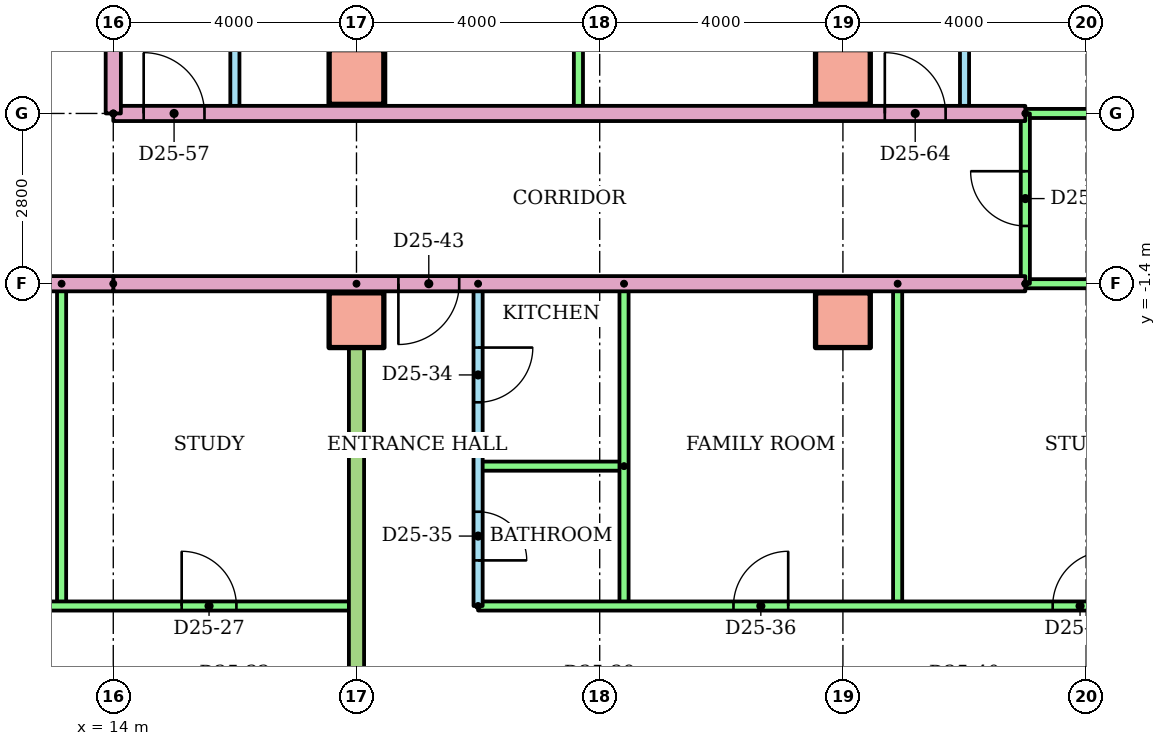
"""IFC4 building model, lengths in metres.
Left out: names, types, materials, properties, quantities, classifications, styles, units other than length and angle.
Written with IfcOpenShell. Run it as: python <this file> out.ifc"""

import sys

from ifc_helpers import new_model, si_unit, direction, frame, frame_2d, origin, origin_2d, place, context, subcontext, project, spatial, rectangle, extrude, element, fill, save


model = new_model("IFC4")
c1 = context("Model", 3, precision=1e-05, world=origin(), true_north=direction((0.0, 1.0)))
c2 = subcontext(c1, "Body", "Model", "MODEL_VIEW")
j1 = project(units=[si_unit("LENGTHUNIT", "METRE"), si_unit("PLANEANGLEUNIT", "RADIAN")], contexts=[c1])
p1 = place(None, origin())
s1 = spatial("IfcSite", under=j1, at=p1, CompositionType="ELEMENT")
p2 = place(p1, origin())
s2 = spatial("IfcBuilding", under=s1, at=p2, CompositionType="ELEMENT")
p3 = place(p2, frame((0.0, 0.0, 96.7)))
s3 = spatial("IfcBuildingStorey", under=s2, at=p3, CompositionType="ELEMENT", Elevation=96.7)
for number, where in (
    (1, (18.0, -2.0, 0.0)),
    (2, (26.0, -2.0, 0.0)),
    (3, (18.0, 2.0, 0.0)),
    (4, (26.0, 2.0, 0.0)),
):
    element("IfcColumn", number, at=place(p3, frame(where)), inside=s3, PredefinedType="COLUMN", context=c2, shape_type="SweptSolid", body=[
        extrude(rectangle(XDim=0.9, YDim=0.9, at=origin_2d()), origin(), (0.0, 0.0, 1.0), 3.2),
    ])
p4 = place(p3, frame((13.15, -1.4, 0.0), z_axis=(0.0, 0.0, 1.0), x_axis=(0.0, -1.0, 0.0)))
e5 = element("IfcWall", 5, at=p4, inside=s3, PredefinedType="PARTITIONING", context=c2, shape_type="SweptSolid", body=[
    extrude(rectangle(XDim=5.3, YDim=0.15, at=frame_2d((2.65, 0.0))), origin(), (0.0, 0.0, 1.0), 2.4),
])
p5 = place(p3, frame((-4.0, -6.7, 0.0)))
e6 = element("IfcWall", 6, at=p5, inside=s3, PredefinedType="PARTITIONING", context=c2, shape_type="SweptSolid", body=[
    extrude(rectangle(XDim=22.0, YDim=0.15, at=frame_2d((11.0, 0.0))), origin(), (0.0, 0.0, 1.0), 2.4),
])
p6 = place(p5, frame((6.075, 0.0, 0.0)))
e7 = element("IfcOpeningElement", 7, at=p6, cuts=e6, PredefinedType="OPENING", context=c2, shape_type="SweptSolid", body=[
    extrude(rectangle(XDim=0.9, YDim=2.1, at=frame_2d((0.45, 1.05))), frame((0.0, 0.085, 0.0), z_axis=(0.0, -1.0, 0.0), x_axis=(1.0, 0.0, 0.0)), (0.0, 0.0, 1.0), 0.17),
])
p7 = place(p5, frame((13.45, 0.0, 0.0)))
e8 = element("IfcOpeningElement", 8, at=p7, cuts=e6, PredefinedType="OPENING", context=c2, shape_type="SweptSolid", body=[
    extrude(rectangle(XDim=0.9, YDim=2.1, at=frame_2d((0.45, 1.05))), frame((0.0, 0.085, 0.0), z_axis=(0.0, -1.0, 0.0), x_axis=(1.0, 0.0, 0.0)), (0.0, 0.0, 1.0), 0.17),
])
p8 = place(p5, frame((19.125, 0.0, 0.0)))
e9 = element("IfcOpeningElement", 9, at=p8, cuts=e6, PredefinedType="OPENING", context=c2, shape_type="SweptSolid", body=[
    extrude(rectangle(XDim=0.9, YDim=2.1, at=frame_2d((0.45, 1.05))), frame((0.0, 0.085, 0.0), z_axis=(0.0, -1.0, 0.0), x_axis=(1.0, 0.0, 0.0)), (0.0, 0.0, 1.0), 0.17),
])
p9 = place(p3, frame((20.0, -1.4, 0.0), z_axis=(0.0, 0.0, 1.0), x_axis=(0.0, -1.0, 0.0)))
e10 = element("IfcWall", 10, at=p9, inside=s3, PredefinedType="PARTITIONING", context=c2, shape_type="SweptSolid", body=[
    extrude(rectangle(XDim=5.3, YDim=0.15, at=frame_2d((2.65, 0.0))), origin(), (0.0, 0.0, 1.0), 2.4),
])
p10 = place(p9, frame((1.05, 0.0, 0.0)))
e11 = element("IfcOpeningElement", 11, at=p10, cuts=e10, PredefinedType="OPENING", context=c2, shape_type="SweptSolid", body=[
    extrude(rectangle(XDim=0.9, YDim=2.1, at=frame_2d((0.45, 1.05))), frame((0.0, 0.085, 0.0), z_axis=(0.0, -1.0, 0.0), x_axis=(1.0, 0.0, 0.0)), (0.0, 0.0, 1.0), 0.17),
])
p11 = place(p9, frame((3.75, 0.0, 0.0)))
e12 = element("IfcOpeningElement", 12, at=p11, cuts=e10, PredefinedType="OPENING", context=c2, shape_type="SweptSolid", body=[
    extrude(rectangle(XDim=0.8, YDim=2.1, at=frame_2d((0.4, 1.05))), frame((0.0, 0.085, 0.0), z_axis=(0.0, -1.0, 0.0), x_axis=(1.0, 0.0, 0.0)), (0.0, 0.0, 1.0), 0.17),
])
p12 = place(p3, frame((22.4, -4.4, 0.0), z_axis=(0.0, 0.0, 1.0), x_axis=(-1.0, 0.0, 0.0)))
e13 = element("IfcWall", 13, at=p12, inside=s3, PredefinedType="PARTITIONING", context=c2, shape_type="SweptSolid", body=[
    extrude(rectangle(XDim=2.4, YDim=0.15, at=frame_2d((1.2, 0.0))), origin(), (0.0, 0.0, 1.0), 2.4),
])
for number, where, z_axis, x_axis in (
    (14, (22.4, -1.4, 0.0), (0.0, 0.0, 1.0), (0.0, -1.0, 0.0)),
    (15, (26.9, -1.4, 0.0), (0.0, 0.0, 1.0), (0.0, -1.0, 0.0)),
):
    element("IfcWall", number, at=place(p3, frame(where, z_axis=z_axis, x_axis=x_axis)), inside=s3, PredefinedType="PARTITIONING", context=c2, shape_type="SweptSolid", body=[
        extrude(rectangle(XDim=5.3, YDim=0.15, at=frame_2d((2.65, 0.0))), origin(), (0.0, 0.0, 1.0), 2.4),
    ])
p13 = place(p3, frame((20.0, -6.7, 0.0)))
e16 = element("IfcWall", 16, at=p13, inside=s3, PredefinedType="PARTITIONING", context=c2, shape_type="SweptSolid", body=[
    extrude(rectangle(XDim=20.62, YDim=0.15, at=frame_2d((10.31, 0.0))), origin(), (0.0, 0.0, 1.0), 2.4),
])
p14 = place(p13, frame((4.2, 0.0, 0.0)))
e17 = element("IfcOpeningElement", 17, at=p14, cuts=e16, PredefinedType="OPENING", context=c2, shape_type="SweptSolid", body=[
    extrude(rectangle(XDim=0.9, YDim=2.1, at=frame_2d((0.45, 1.05))), frame((0.0, 0.085, 0.0), z_axis=(0.0, -1.0, 0.0), x_axis=(1.0, 0.0, 0.0)), (0.0, 0.0, 1.0), 0.17),
])
p15 = place(p13, frame((9.45, 0.0, 0.0)))
e18 = element("IfcOpeningElement", 18, at=p15, cuts=e16, PredefinedType="OPENING", context=c2, shape_type="SweptSolid", body=[
    extrude(rectangle(XDim=0.9, YDim=2.1, at=frame_2d((0.45, 1.05))), frame((0.0, 0.085, 0.0), z_axis=(0.0, -1.0, 0.0), x_axis=(1.0, 0.0, 0.0)), (0.0, 0.0, 1.0), 0.17),
])
p16 = place(p13, frame((16.2, 0.0, 0.0)))
e19 = element("IfcOpeningElement", 19, at=p16, cuts=e16, PredefinedType="OPENING", context=c2, shape_type="SweptSolid", body=[
    extrude(rectangle(XDim=0.9, YDim=2.1, at=frame_2d((0.45, 1.05))), frame((0.0, 0.085, 0.0), z_axis=(0.0, -1.0, 0.0), x_axis=(1.0, 0.0, 0.0)), (0.0, 0.0, 1.0), 0.17),
])
p17 = place(p3, frame((18.0, -1.4, 0.0), z_axis=(0.0, 0.0, 1.0), x_axis=(0.0, -1.0, 0.0)))
e20 = element("IfcWall", 20, at=p17, inside=s3, PredefinedType="PARTITIONING", context=c2, shape_type="SweptSolid", body=[
    extrude(rectangle(XDim=14.81, YDim=0.25, at=frame_2d((7.405, 0.0))), origin(), (0.0, 0.0, 1.0), 2.4),
])
p18 = place(p3, frame((29.0, -1.4, 0.0), z_axis=(0.0, 0.0, 1.0), x_axis=(-1.0, 0.0, 0.0)))
e21 = element("IfcWall", 21, at=p18, inside=s3, PredefinedType="PARTITIONING", context=c2, shape_type="SweptSolid", body=[
    extrude(rectangle(XDim=15.0, YDim=0.25, at=frame_2d((7.5, 0.0))), origin(), (0.0, 0.0, 1.0), 2.4),
])
p19 = place(p18, frame((9.311, 0.0, 0.0)))
e22 = element("IfcOpeningElement", 22, at=p19, cuts=e21, PredefinedType="OPENING", context=c2, shape_type="SweptSolid", body=[
    extrude(rectangle(XDim=1.0, YDim=2.1, at=frame_2d((0.5, 1.05))), frame((0.0, 0.135, 0.0), z_axis=(0.0, -1.0, 0.0), x_axis=(1.0, 0.0, 0.0)), (0.0, 0.0, 1.0), 0.27),
])
p20 = place(p3, frame((40.62, -1.4, 0.0), z_axis=(0.0, 0.0, 1.0), x_axis=(-1.0, 0.0, 0.0)))
e23 = element("IfcWall", 23, at=p20, inside=s3, PredefinedType="PARTITIONING", context=c2, shape_type="SweptSolid", body=[
    extrude(rectangle(XDim=11.62, YDim=0.15, at=frame_2d((5.81, 0.0))), origin(), (0.0, 0.0, 1.0), 2.4),
])
p21 = place(p3, frame((16.0, 9.1, 0.0), z_axis=(0.0, 0.0, 1.0), x_axis=(0.0, -1.0, 0.0)))
e24 = element("IfcWall", 24, at=p21, inside=s3, PredefinedType="PARTITIONING", context=c2, shape_type="SweptSolid", body=[
    extrude(rectangle(XDim=7.7, YDim=0.15, at=frame_2d((3.85, 0.0))), origin(), (0.0, 0.0, 1.0), 2.4),
])
p22 = place(p21, frame((5.125, 0.0, 0.0)))
e25 = element("IfcOpeningElement", 25, at=p22, cuts=e24, PredefinedType="OPENING", context=c2, shape_type="SweptSolid", body=[
    extrude(rectangle(XDim=0.9, YDim=2.1, at=frame_2d((0.45, 1.05))), frame((0.0, 0.085, 0.0), z_axis=(0.0, -1.0, 0.0), x_axis=(1.0, 0.0, 0.0)), (0.0, 0.0, 1.0), 0.17),
])
p23 = place(p21, frame((1.325, 0.0, 0.0)))
e26 = element("IfcOpeningElement", 26, at=p23, cuts=e24, PredefinedType="OPENING", context=c2, shape_type="SweptSolid", body=[
    extrude(rectangle(XDim=0.8, YDim=2.1, at=frame_2d((0.4, 1.05))), frame((0.0, 0.085, 0.0), z_axis=(0.0, -1.0, 0.0), x_axis=(1.0, 0.0, 0.0)), (0.0, 0.0, 1.0), 0.17),
])
for number, where, z_axis, x_axis in (
    (27, (18.4, 9.1, 0.0), (0.0, 0.0, 1.0), (0.0, -1.0, 0.0)),
    (28, (21.65, 9.1, 0.0), (0.0, 0.0, 1.0), (0.0, -1.0, 0.0)),
):
    element("IfcWall", number, at=place(p3, frame(where, z_axis=z_axis, x_axis=x_axis)), inside=s3, PredefinedType="PARTITIONING", context=c2, shape_type="SweptSolid", body=[
        extrude(rectangle(XDim=7.7, YDim=0.15, at=frame_2d((3.85, 0.0))), origin(), (0.0, 0.0, 1.0), 2.4),
    ])
p24 = place(p3, frame((28.0, 9.1, 0.0), z_axis=(0.0, 0.0, 1.0), x_axis=(0.0, -1.0, 0.0)))
e29 = element("IfcWall", 29, at=p24, inside=s3, PredefinedType="PARTITIONING", context=c2, shape_type="SweptSolid", body=[
    extrude(rectangle(XDim=7.7, YDim=0.15, at=frame_2d((3.85, 0.0))), origin(), (0.0, 0.0, 1.0), 2.4),
])
p25 = place(p24, frame((5.125, 0.0, 0.0)))
e30 = element("IfcOpeningElement", 30, at=p25, cuts=e29, PredefinedType="OPENING", context=c2, shape_type="SweptSolid", body=[
    extrude(rectangle(XDim=0.9, YDim=2.1, at=frame_2d((0.45, 1.05))), frame((0.0, 0.085, 0.0), z_axis=(0.0, -1.0, 0.0), x_axis=(1.0, 0.0, 0.0)), (0.0, 0.0, 1.0), 0.17),
])
p26 = place(p24, frame((1.325, 0.0, 0.0)))
e31 = element("IfcOpeningElement", 31, at=p26, cuts=e29, PredefinedType="OPENING", context=c2, shape_type="SweptSolid", body=[
    extrude(rectangle(XDim=0.8, YDim=2.1, at=frame_2d((0.4, 1.05))), frame((0.0, 0.085, 0.0), z_axis=(0.0, -1.0, 0.0), x_axis=(1.0, 0.0, 0.0)), (0.0, 0.0, 1.0), 0.17),
])
p27 = place(p3, frame((26.0, 18.621, 0.0), z_axis=(0.0, 0.0, 1.0), x_axis=(0.0, -1.0, 0.0)))
e32 = element("IfcWall", 32, at=p27, inside=s3, PredefinedType="PARTITIONING", context=c2, shape_type="SweptSolid", body=[
    extrude(rectangle(XDim=17.221, YDim=0.25, at=frame_2d((8.611, 0.0))), origin(), (0.0, 0.0, 1.0), 2.4),
])
p28 = place(p3, frame((14.0, 1.4, 0.0)))
e33 = element("IfcWall", 33, at=p28, inside=s3, PredefinedType="PARTITIONING", context=c2, shape_type="SweptSolid", body=[
    extrude(rectangle(XDim=15.0, YDim=0.25, at=frame_2d((7.5, 0.0))), origin(), (0.0, 0.0, 1.0), 2.4),
])
p29 = place(p28, frame((0.5, 0.0, 0.0)))
e34 = element("IfcOpeningElement", 34, at=p29, cuts=e33, PredefinedType="OPENING", context=c2, shape_type="SweptSolid", body=[
    extrude(rectangle(XDim=1.0, YDim=2.1, at=frame_2d((0.5, 1.05))), frame((0.0, 0.135, 0.0), z_axis=(0.0, -1.0, 0.0), x_axis=(1.0, 0.0, 0.0)), (0.0, 0.0, 1.0), 0.27),
])
p30 = place(p28, frame((12.689, 0.0, 0.0)))
e35 = element("IfcOpeningElement", 35, at=p30, cuts=e33, PredefinedType="OPENING", context=c2, shape_type="SweptSolid", body=[
    extrude(rectangle(XDim=1.0, YDim=2.1, at=frame_2d((0.5, 1.05))), frame((0.0, 0.135, 0.0), z_axis=(0.0, -1.0, 0.0), x_axis=(1.0, 0.0, 0.0)), (0.0, 0.0, 1.0), 0.27),
])
p31 = place(p3, frame((29.0, 1.4, 0.0)))
e36 = element("IfcWall", 36, at=p31, inside=s3, PredefinedType="PARTITIONING", context=c2, shape_type="SweptSolid", body=[
    extrude(rectangle(XDim=11.62, YDim=0.15, at=frame_2d((5.81, 0.0))), origin(), (0.0, 0.0, 1.0), 2.4),
])
p32 = place(p3, frame((29.0, -1.4, 0.0), z_axis=(0.0, 0.0, 1.0), x_axis=(0.0, 1.0, 0.0)))
e37 = element("IfcWall", 37, at=p32, inside=s3, PredefinedType="PARTITIONING", context=c2, shape_type="SweptSolid", body=[
    extrude(rectangle(XDim=2.8, YDim=0.15, at=frame_2d((1.4, 0.0))), origin(), (0.0, 0.0, 1.0), 2.4),
])
p33 = place(p32, frame((0.95, 0.0, 0.0)))
e38 = element("IfcOpeningElement", 38, at=p33, cuts=e37, PredefinedType="OPENING", context=c2, shape_type="SweptSolid", body=[
    extrude(rectangle(XDim=0.9, YDim=2.1, at=frame_2d((0.45, 1.05))), frame((0.0, 0.085, 0.0), z_axis=(0.0, -1.0, 0.0), x_axis=(1.0, 0.0, 0.0)), (0.0, 0.0, 1.0), 0.17),
])
p34 = place(p3, frame((14.0, -1.4, 0.0), z_axis=(0.0, 0.0, 1.0), x_axis=(-1.0, 0.0, 0.0)))
e39 = element("IfcWall", 39, at=p34, inside=s3, PredefinedType="PARTITIONING", context=c2, shape_type="SweptSolid", body=[
    extrude(rectangle(XDim=28.0, YDim=0.25, at=frame_2d((14.0, 0.0))), origin(), (0.0, 0.0, 1.0), 2.4),
])
p35 = place(p34, frame((20.689, 0.0, 0.0)))
e40 = element("IfcOpeningElement", 40, at=p35, cuts=e39, PredefinedType="OPENING", context=c2, shape_type="SweptSolid", body=[
    extrude(rectangle(XDim=1.0, YDim=2.1, at=frame_2d((0.5, 1.05))), frame((0.0, 0.135, 0.0), z_axis=(0.0, -1.0, 0.0), x_axis=(1.0, 0.0, 0.0)), (0.0, 0.0, 1.0), 0.27),
])
p36 = place(p34, frame((18.311, 0.0, 0.0)))
e41 = element("IfcOpeningElement", 41, at=p36, cuts=e39, PredefinedType="OPENING", context=c2, shape_type="SweptSolid", body=[
    extrude(rectangle(XDim=1.0, YDim=2.1, at=frame_2d((0.5, 1.05))), frame((0.0, 0.135, 0.0), z_axis=(0.0, -1.0, 0.0), x_axis=(1.0, 0.0, 0.0)), (0.0, 0.0, 1.0), 0.27),
])
p37 = place(p3, frame((14.0, 1.4, 0.0), z_axis=(0.0, 0.0, 1.0), x_axis=(0.0, 1.0, 0.0)))
e42 = element("IfcWall", 42, at=p37, inside=s3, PredefinedType="PARTITIONING", context=c2, shape_type="SweptSolid", body=[
    extrude(rectangle(XDim=1.6, YDim=0.25, at=frame_2d((0.8, 0.0))), origin(), (0.0, 0.0, 1.0), 2.4),
])
p38 = place(p8, origin())
e43 = element("IfcDoor", 43, at=p38, inside=s3, OperationType="SINGLE_SWING_LEFT", PredefinedType="DOOR", context=c2, shape_type="SweptSolid", body=[
    extrude(rectangle(XDim=0.9, YDim=2.1, at=frame_2d((0.45, 1.05))), frame((0.0, 0.025, 0.0), z_axis=(0.0, -1.0, 0.0), x_axis=(1.0, 0.0, 0.0)), (0.0, 0.0, 1.0), 0.05),
])
fill(e9, e43)
p39 = place(p10, origin())
e44 = element("IfcDoor", 44, at=p39, inside=s3, OperationType="SINGLE_SWING_LEFT", PredefinedType="DOOR", context=c2, shape_type="SweptSolid", body=[
    extrude(rectangle(XDim=0.9, YDim=2.1, at=frame_2d((0.45, 1.05))), frame((0.0, 0.025, 0.0), z_axis=(0.0, -1.0, 0.0), x_axis=(1.0, 0.0, 0.0)), (0.0, 0.0, 1.0), 0.05),
])
fill(e11, e44)
p40 = place(p11, origin())
e45 = element("IfcDoor", 45, at=p40, inside=s3, OperationType="SINGLE_SWING_RIGHT", PredefinedType="DOOR", context=c2, shape_type="SweptSolid", body=[
    extrude(rectangle(XDim=0.8, YDim=2.1, at=frame_2d((0.4, 1.05))), frame((0.0, 0.025, 0.0), z_axis=(0.0, -1.0, 0.0), x_axis=(1.0, 0.0, 0.0)), (0.0, 0.0, 1.0), 0.05),
])
fill(e12, e45)
p41 = place(p14, origin())
e46 = element("IfcDoor", 46, at=p41, inside=s3, OperationType="SINGLE_SWING_RIGHT", PredefinedType="DOOR", context=c2, shape_type="SweptSolid", body=[
    extrude(rectangle(XDim=0.9, YDim=2.1, at=frame_2d((0.45, 1.05))), frame((0.0, 0.025, 0.0), z_axis=(0.0, -1.0, 0.0), x_axis=(1.0, 0.0, 0.0)), (0.0, 0.0, 1.0), 0.05),
])
fill(e17, e46)
p42 = place(p15, origin())
e47 = element("IfcDoor", 47, at=p42, inside=s3, OperationType="SINGLE_SWING_RIGHT", PredefinedType="DOOR", context=c2, shape_type="SweptSolid", body=[
    extrude(rectangle(XDim=0.9, YDim=2.1, at=frame_2d((0.45, 1.05))), frame((0.0, 0.025, 0.0), z_axis=(0.0, -1.0, 0.0), x_axis=(1.0, 0.0, 0.0)), (0.0, 0.0, 1.0), 0.05),
])
fill(e18, e47)
p43 = place(p19, origin())
e48 = element("IfcDoor", 48, at=p43, inside=s3, OperationType="SINGLE_SWING_RIGHT", PredefinedType="DOOR", context=c2, shape_type="SweptSolid", body=[
    extrude(rectangle(XDim=1.0, YDim=2.1, at=frame_2d((0.5, 1.05))), frame((0.0, 0.025, 0.0), z_axis=(0.0, -1.0, 0.0), x_axis=(1.0, 0.0, 0.0)), (0.0, 0.0, 1.0), 0.05),
])
fill(e22, e48)
p44 = place(p29, origin())
e49 = element("IfcDoor", 49, at=p44, inside=s3, OperationType="SINGLE_SWING_LEFT", PredefinedType="DOOR", context=c2, shape_type="SweptSolid", body=[
    extrude(rectangle(XDim=1.0, YDim=2.1, at=frame_2d((0.5, 1.05))), frame((0.0, 0.025, 0.0), z_axis=(0.0, -1.0, 0.0), x_axis=(1.0, 0.0, 0.0)), (0.0, 0.0, 1.0), 0.05),
])
fill(e34, e49)
p45 = place(p30, origin())
e50 = element("IfcDoor", 50, at=p45, inside=s3, OperationType="SINGLE_SWING_LEFT", PredefinedType="DOOR", context=c2, shape_type="SweptSolid", body=[
    extrude(rectangle(XDim=1.0, YDim=2.1, at=frame_2d((0.5, 1.05))), frame((0.0, 0.025, 0.0), z_axis=(0.0, -1.0, 0.0), x_axis=(1.0, 0.0, 0.0)), (0.0, 0.0, 1.0), 0.05),
])
fill(e35, e50)
p46 = place(p33, origin())
e51 = element("IfcDoor", 51, at=p46, inside=s3, OperationType="SINGLE_SWING_RIGHT", PredefinedType="DOOR", context=c2, shape_type="SweptSolid", body=[
    extrude(rectangle(XDim=0.9, YDim=2.1, at=frame_2d((0.45, 1.05))), frame((0.0, 0.025, 0.0), z_axis=(0.0, -1.0, 0.0), x_axis=(1.0, 0.0, 0.0)), (0.0, 0.0, 1.0), 0.05),
])
fill(e38, e51)
save(model, sys.argv[1])
